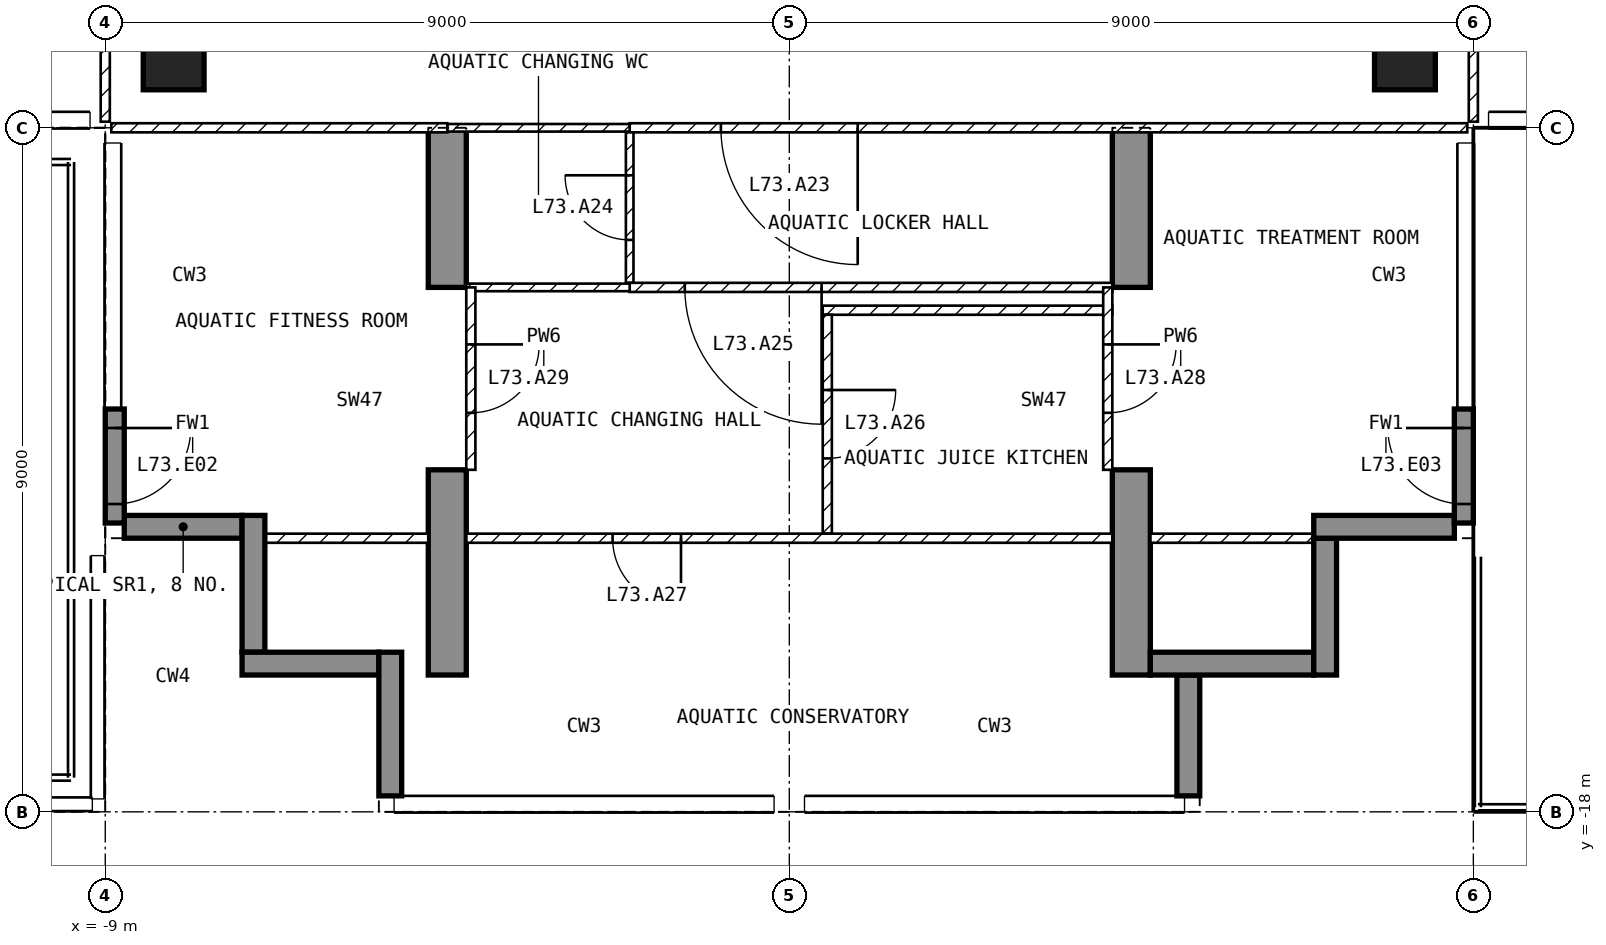
"""IFC4 building model, lengths in metres.
Left out: names, types, materials, properties, quantities, classifications, styles, units other than length and angle.
Written with IfcOpenShell. Run it as: python <this file> out.ifc"""

import sys

from ifc_helpers import new_model, si_unit, direction, frame, frame_2d, origin, origin_2d, place, context, subcontext, project, spatial, polyline, rectangle, outline, extrude, element, fill, save


model = new_model("IFC4")
c1 = context("Model", 3, precision=1e-05, world=origin(), true_north=direction((0.0, 1.0)))
c2 = subcontext(c1, "Body", "Model", "MODEL_VIEW")
j1 = project(units=[si_unit("LENGTHUNIT", "METRE"), si_unit("PLANEANGLEUNIT", "RADIAN")], contexts=[c1])
p1 = place(None, origin())
s1 = spatial("IfcSite", under=j1, at=p1, CompositionType="ELEMENT")
p2 = place(p1, origin())
s2 = spatial("IfcBuilding", under=s1, at=p2, CompositionType="ELEMENT")
p3 = place(p2, frame((0.0, 0.0, 285.0)))
s3 = spatial("IfcBuildingStorey", under=s2, at=p3, CompositionType="ELEMENT", Elevation=285.0)
for number, where, z_axis, x_axis in (
    (1, (-8.1, -8.1, -0.3), (0.0, 0.0, 1.0), (1.0, 0.0, 0.0)),
    (2, (8.1, -8.1, -0.3), (0.0, 0.0, 1.0), (1.0, 0.0, 0.0)),
):
    element("IfcColumn", number, at=place(p3, frame(where, z_axis=z_axis, x_axis=x_axis)), inside=s3, PredefinedType="COLUMN", context=c2, shape_type="SweptSolid", body=[
        extrude(rectangle(XDim=0.8, YDim=0.8, at=origin_2d()), origin(), (0.0, 0.0, 1.0), 5.45),
    ])
for number, where, z_axis, x_axis in (
    (3, (-4.75, -16.2, -0.3), (1.0, 0.0, 0.0), (0.0, 1.0, 0.0)),
    (4, (4.25, -16.2, -0.3), (1.0, 0.0, 0.0), (0.0, 1.0, 0.0)),
):
    element("IfcWall", number, at=place(p3, frame(where, z_axis=z_axis, x_axis=x_axis)), inside=s3, PredefinedType="SHEAR", context=c2, shape_type="SweptSolid", body=[
        extrude(outline(polyline([(0.0, 0.0), (2.7, 0.0), (2.7, 2.7), (5.1, 2.7), (5.1, 0.0), (7.2, 0.0), (7.2, 5.45), (0.0, 5.45), (0.0, 0.0)])), origin(), (0.0, 0.0, 1.0), 0.5),
    ])
p4 = place(p3, frame((-8.875, -12.7, 0.0), z_axis=(0.0, 0.0, 1.0), x_axis=(0.0, -1.0, 0.0)))
e5 = element("IfcWall", 5, at=p4, inside=s3, PredefinedType="SOLIDWALL", context=c2, shape_type="SweptSolid", body=[
    extrude(rectangle(XDim=1.5, YDim=0.25, at=frame_2d((0.75, 0.0))), origin(), (0.0, 0.0, 1.0), 5.15),
])
p5 = place(p4, frame((0.25, 0.0, 0.0)))
e6 = element("IfcOpeningElement", 6, at=p5, cuts=e5, PredefinedType="OPENING", context=c2, shape_type="SweptSolid", body=[
    extrude(rectangle(XDim=1.0, YDim=2.4, at=frame_2d((0.5, 1.2))), frame((0.0, 0.135, 0.0), z_axis=(0.0, -1.0, 0.0), x_axis=(1.0, 0.0, 0.0)), (0.0, 0.0, 1.0), 0.27),
])
p6 = place(p3, frame((8.875, -14.2, 0.0), z_axis=(0.0, 0.0, 1.0), x_axis=(0.0, 1.0, 0.0)))
e7 = element("IfcWall", 7, at=p6, inside=s3, PredefinedType="SOLIDWALL", context=c2, shape_type="SweptSolid", body=[
    extrude(rectangle(XDim=1.5, YDim=0.25, at=frame_2d((0.75, 0.0))), origin(), (0.0, 0.0, 1.0), 5.15),
])
p7 = place(p6, frame((0.25, 0.0, 0.0)))
e8 = element("IfcOpeningElement", 8, at=p7, cuts=e7, PredefinedType="OPENING", context=c2, shape_type="SweptSolid", body=[
    extrude(rectangle(XDim=1.0, YDim=2.4, at=frame_2d((0.5, 1.2))), frame((0.0, 0.135, 0.0), z_axis=(0.0, -1.0, 0.0), x_axis=(1.0, 0.0, 0.0)), (0.0, 0.0, 1.0), 0.27),
])
p8 = place(p3, frame((5.25, -17.79, 0.0), z_axis=(0.0, 0.0, 1.0), x_axis=(0.0, 1.0, 0.0)))
e9 = element("IfcWall", 9, at=p8, inside=s3, PredefinedType="SOLIDWALL", context=c2, shape_type="SweptSolid", body=[
    extrude(rectangle(XDim=1.59, YDim=0.3, at=frame_2d((0.795, 0.0))), origin(), (0.0, 0.0, 1.0), 5.15),
])
p9 = place(p3, frame((4.75, -16.05, 0.0), z_axis=(0.0, 0.0, 1.0), x_axis=(1.0, 0.0, 0.0)))
e10 = element("IfcWall", 10, at=p9, inside=s3, PredefinedType="SOLIDWALL", context=c2, shape_type="SweptSolid", body=[
    extrude(rectangle(XDim=2.15, YDim=0.3, at=frame_2d((1.075, 0.0))), origin(), (0.0, 0.0, 1.0), 5.15),
])
p10 = place(p3, frame((7.05, -16.2, 0.0), z_axis=(0.0, 0.0, 1.0), x_axis=(0.0, 1.0, 0.0)))
e11 = element("IfcWall", 11, at=p10, inside=s3, PredefinedType="SOLIDWALL", context=c2, shape_type="SweptSolid", body=[
    extrude(rectangle(XDim=1.8, YDim=0.3, at=frame_2d((0.9, 0.0))), origin(), (0.0, 0.0, 1.0), 5.15),
])
p11 = place(p3, frame((6.9, -14.25, 0.0), z_axis=(0.0, 0.0, 1.0), x_axis=(1.0, 0.0, 0.0)))
e12 = element("IfcWall", 12, at=p11, inside=s3, PredefinedType="SOLIDWALL", context=c2, shape_type="SweptSolid", body=[
    extrude(rectangle(XDim=1.85, YDim=0.3, at=frame_2d((0.925, 0.0))), origin(), (0.0, 0.0, 1.0), 5.15),
])
p12 = place(p3, frame((-8.75, -14.25, 0.0), z_axis=(0.0, 0.0, 1.0), x_axis=(1.0, 0.0, 0.0)))
e13 = element("IfcWall", 13, at=p12, inside=s3, PredefinedType="SOLIDWALL", context=c2, shape_type="SweptSolid", body=[
    extrude(rectangle(XDim=1.55, YDim=0.3, at=frame_2d((0.775, 0.0))), origin(), (0.0, 0.0, 1.0), 5.15),
])
p13 = place(p3, frame((-7.05, -14.1, 0.0), z_axis=(0.0, 0.0, 1.0), x_axis=(0.0, -1.0, 0.0)))
e14 = element("IfcWall", 14, at=p13, inside=s3, PredefinedType="SOLIDWALL", context=c2, shape_type="SweptSolid", body=[
    extrude(rectangle(XDim=1.8, YDim=0.3, at=frame_2d((0.9, 0.0))), origin(), (0.0, 0.0, 1.0), 5.15),
])
p14 = place(p3, frame((-7.2, -16.05, 0.0), z_axis=(0.0, 0.0, 1.0), x_axis=(1.0, 0.0, 0.0)))
e15 = element("IfcWall", 15, at=p14, inside=s3, PredefinedType="SOLIDWALL", context=c2, shape_type="SweptSolid", body=[
    extrude(rectangle(XDim=1.8, YDim=0.3, at=frame_2d((0.9, 0.0))), origin(), (0.0, 0.0, 1.0), 5.15),
])
p15 = place(p3, frame((-5.25, -15.9, 0.0), z_axis=(0.0, 0.0, 1.0), x_axis=(0.0, -1.0, 0.0)))
e16 = element("IfcWall", 16, at=p15, inside=s3, PredefinedType="SOLIDWALL", context=c2, shape_type="SweptSolid", body=[
    extrude(rectangle(XDim=1.89, YDim=0.3, at=frame_2d((0.945, 0.0))), origin(), (0.0, 0.0, 1.0), 5.15),
])
p16 = place(p3, frame((9.0, -1.26, 0.0), z_axis=(0.0, 0.0, 1.0), x_axis=(0.0, -1.0, 0.0)))
e17 = element("IfcWall", 17, at=p16, inside=s3, PredefinedType="PARTITIONING", context=c2, shape_type="SweptSolid", body=[
    extrude(rectangle(XDim=7.66, YDim=0.12, at=frame_2d((3.83, 0.0))), origin(), (0.0, 0.0, 1.0), 5.15),
])
p17 = place(p16, frame((4.44, 0.0, 0.0)))
e18 = element("IfcOpeningElement", 18, at=p17, cuts=e17, PredefinedType="OPENING", context=c2, shape_type="SweptSolid", body=[
    extrude(rectangle(XDim=0.9, YDim=2.1, at=frame_2d((0.45, 1.05))), frame((0.0, 0.07, 0.0), z_axis=(0.0, -1.0, 0.0), x_axis=(1.0, 0.0, 0.0)), (0.0, 0.0, 1.0), 0.14),
])
p18 = place(p3, frame((-9.0, -8.92, 0.0), z_axis=(0.0, 0.0, 1.0), x_axis=(0.0, 1.0, 0.0)))
e19 = element("IfcWall", 19, at=p18, inside=s3, PredefinedType="PARTITIONING", context=c2, shape_type="SweptSolid", body=[
    extrude(rectangle(XDim=7.66, YDim=0.12, at=frame_2d((3.83, 0.0))), origin(), (0.0, 0.0, 1.0), 5.15),
])
p19 = place(p18, frame((2.32, 0.0, 0.0)))
e20 = element("IfcOpeningElement", 20, at=p19, cuts=e19, PredefinedType="OPENING", context=c2, shape_type="SweptSolid", body=[
    extrude(rectangle(XDim=0.9, YDim=2.1, at=frame_2d((0.45, 1.05))), frame((0.0, 0.07, 0.0), z_axis=(0.0, -1.0, 0.0), x_axis=(1.0, 0.0, 0.0)), (0.0, 0.0, 1.0), 0.14),
])
p20 = place(p18, frame((5.89, 0.0, 0.0)))
e21 = element("IfcOpeningElement", 21, at=p20, cuts=e19, PredefinedType="OPENING", context=c2, shape_type="SweptSolid", body=[
    extrude(rectangle(XDim=0.9, YDim=2.1, at=frame_2d((0.45, 1.05))), frame((0.0, 0.07, 0.0), z_axis=(0.0, -1.0, 0.0), x_axis=(1.0, 0.0, 0.0)), (0.0, 0.0, 1.0), 0.14),
])
p21 = place(p3, frame((8.92, -9.0, 0.0), z_axis=(0.0, 0.0, 1.0), x_axis=(-1.0, 0.0, 0.0)))
e22 = element("IfcWall", 22, at=p21, inside=s3, PredefinedType="PARTITIONING", context=c2, shape_type="SweptSolid", body=[
    extrude(rectangle(XDim=11.02, YDim=0.12, at=frame_2d((5.51, 0.0))), origin(), (0.0, 0.0, 1.0), 5.15),
])
p22 = place(p21, frame((8.02, 0.0, 0.0)))
e23 = element("IfcOpeningElement", 23, at=p22, cuts=e22, PredefinedType="OPENING", context=c2, shape_type="SweptSolid", body=[
    extrude(rectangle(XDim=1.8, YDim=2.1, at=frame_2d((0.9, 1.05))), frame((0.0, 0.07, 0.0), z_axis=(0.0, -1.0, 0.0), x_axis=(1.0, 0.0, 0.0)), (0.0, 0.0, 1.0), 0.14),
])
p23 = place(p3, frame((-2.1, -9.0, 0.0), z_axis=(0.0, 0.0, 1.0), x_axis=(-1.0, 0.0, 0.0)))
e24 = element("IfcWall", 24, at=p23, inside=s3, PredefinedType="PARTITIONING", context=c2, shape_type="SweptSolid", body=[
    extrude(rectangle(XDim=2.4, YDim=0.1, at=frame_2d((1.2, 0.0))), origin(), (0.0, 0.0, 1.0), 5.15),
])
p24 = place(p3, frame((-4.5, -9.0, 0.0), z_axis=(0.0, 0.0, 1.0), x_axis=(-1.0, 0.0, 0.0)))
e25 = element("IfcWall", 25, at=p24, inside=s3, PredefinedType="PARTITIONING", context=c2, shape_type="SweptSolid", body=[
    extrude(rectangle(XDim=4.42, YDim=0.12, at=frame_2d((2.21, 0.0))), origin(), (0.0, 0.0, 1.0), 5.15),
])
p25 = place(p3, frame((-2.1, -11.04, 0.0), z_axis=(0.0, 0.0, 1.0), x_axis=(0.0, 1.0, 0.0)))
e26 = element("IfcWall", 26, at=p25, inside=s3, PredefinedType="PARTITIONING", context=c2, shape_type="SweptSolid", body=[
    extrude(rectangle(XDim=1.98, YDim=0.1, at=frame_2d((0.99, 0.0))), origin(), (0.0, 0.0, 1.0), 5.15),
])
p26 = place(p25, frame((0.565, 0.0, 0.0)))
e27 = element("IfcOpeningElement", 27, at=p26, cuts=e26, PredefinedType="OPENING", context=c2, shape_type="SweptSolid", body=[
    extrude(rectangle(XDim=0.85, YDim=2.1, at=frame_2d((0.425, 1.05))), frame((0.0, 0.06, 0.0), z_axis=(0.0, -1.0, 0.0), x_axis=(1.0, 0.0, 0.0)), (0.0, 0.0, 1.0), 0.12),
])
p27 = place(p3, frame((4.25, -11.1, 0.0), z_axis=(0.0, 0.0, 1.0), x_axis=(-1.0, 0.0, 0.0)))
e28 = element("IfcWall", 28, at=p27, inside=s3, PredefinedType="PARTITIONING", context=c2, shape_type="SweptSolid", body=[
    extrude(rectangle(XDim=6.35, YDim=0.12, at=frame_2d((3.175, 0.0))), origin(), (0.0, 0.0, 1.0), 5.15),
])
p28 = place(p27, frame((3.825, 0.0, 0.0)))
e29 = element("IfcOpeningElement", 29, at=p28, cuts=e28, PredefinedType="OPENING", context=c2, shape_type="SweptSolid", body=[
    extrude(rectangle(XDim=1.8, YDim=2.1, at=frame_2d((0.9, 1.05))), frame((0.0, 0.07, 0.0), z_axis=(0.0, -1.0, 0.0), x_axis=(1.0, 0.0, 0.0)), (0.0, 0.0, 1.0), 0.14),
])
p29 = place(p3, frame((-2.1, -11.1, 0.0), z_axis=(0.0, 0.0, 1.0), x_axis=(-1.0, 0.0, 0.0)))
e30 = element("IfcWall", 30, at=p29, inside=s3, PredefinedType="PARTITIONING", context=c2, shape_type="SweptSolid", body=[
    extrude(rectangle(XDim=2.15, YDim=0.1, at=frame_2d((1.075, 0.0))), origin(), (0.0, 0.0, 1.0), 5.15),
])
p30 = place(p3, frame((4.25, -11.4, 0.0), z_axis=(0.0, 0.0, 1.0), x_axis=(-1.0, 0.0, 0.0)))
e31 = element("IfcWall", 31, at=p30, inside=s3, PredefinedType="PARTITIONING", context=c2, shape_type="SweptSolid", body=[
    extrude(rectangle(XDim=3.81, YDim=0.12, at=frame_2d((1.905, 0.0))), origin(), (0.0, 0.0, 1.0), 5.15),
])
p31 = place(p3, frame((0.5, -11.46, 0.0), z_axis=(0.0, 0.0, 1.0), x_axis=(0.0, -1.0, 0.0)))
e32 = element("IfcWall", 32, at=p31, inside=s3, PredefinedType="PARTITIONING", context=c2, shape_type="SweptSolid", body=[
    extrude(rectangle(XDim=2.88, YDim=0.12, at=frame_2d((1.44, 0.0))), origin(), (0.0, 0.0, 1.0), 5.15),
])
p32 = place(p31, frame((0.99, 0.0, 0.0)))
e33 = element("IfcOpeningElement", 33, at=p32, cuts=e32, PredefinedType="OPENING", context=c2, shape_type="SweptSolid", body=[
    extrude(rectangle(XDim=0.9, YDim=2.1, at=frame_2d((0.45, 1.05))), frame((0.0, 0.07, 0.0), z_axis=(0.0, -1.0, 0.0), x_axis=(1.0, 0.0, 0.0)), (0.0, 0.0, 1.0), 0.14),
])
p33 = place(p3, frame((4.25, -14.4, 0.0), z_axis=(0.0, 0.0, 1.0), x_axis=(-1.0, 0.0, 0.0)))
e34 = element("IfcWall", 34, at=p33, inside=s3, PredefinedType="PARTITIONING", context=c2, shape_type="SweptSolid", body=[
    extrude(rectangle(XDim=8.5, YDim=0.12, at=frame_2d((4.25, 0.0))), origin(), (0.0, 0.0, 1.0), 5.15),
])
p34 = place(p33, frame((5.675, 0.0, 0.0)))
e35 = element("IfcOpeningElement", 35, at=p34, cuts=e34, PredefinedType="OPENING", context=c2, shape_type="SweptSolid", body=[
    extrude(rectangle(XDim=0.9, YDim=2.1, at=frame_2d((0.45, 1.05))), frame((0.0, 0.07, 0.0), z_axis=(0.0, -1.0, 0.0), x_axis=(1.0, 0.0, 0.0)), (0.0, 0.0, 1.0), 0.14),
])
for number, where, z_axis, x_axis in (
    (36, (7.12, -14.4, 0.0), (0.0, 0.0, 1.0), (-1.0, 0.0, 0.0)),
    (37, (-4.75, -14.4, 0.0), (0.0, 0.0, 1.0), (-1.0, 0.0, 0.0)),
):
    element("IfcWall", number, at=place(p3, frame(where, z_axis=z_axis, x_axis=x_axis)), inside=s3, PredefinedType="PARTITIONING", context=c2, shape_type="SweptSolid", body=[
        extrude(rectangle(XDim=2.37, YDim=0.12, at=frame_2d((1.185, 0.0))), origin(), (0.0, 0.0, 1.0), 5.15),
    ])
p35 = place(p3, frame((4.19, -11.1, 0.0), z_axis=(0.0, 0.0, 1.0), x_axis=(0.0, -1.0, 0.0)))
e38 = element("IfcWall", 38, at=p35, inside=s3, PredefinedType="PARTITIONING", context=c2, shape_type="SweptSolid", body=[
    extrude(rectangle(XDim=2.4, YDim=0.12, at=frame_2d((1.2, 0.0))), origin(), (0.0, 0.0, 1.0), 2.4),
])
p36 = place(p35, frame((0.75, 0.0, 0.0)))
e39 = element("IfcOpeningElement", 39, at=p36, cuts=e38, PredefinedType="OPENING", context=c2, shape_type="SweptSolid", body=[
    extrude(rectangle(XDim=0.9, YDim=2.1, at=frame_2d((0.45, 1.05))), frame((0.0, 0.07, 0.0), z_axis=(0.0, -1.0, 0.0), x_axis=(1.0, 0.0, 0.0)), (0.0, 0.0, 1.0), 0.14),
])
p37 = place(p3, frame((-4.19, -11.1, 0.0), z_axis=(0.0, 0.0, 1.0), x_axis=(0.0, -1.0, 0.0)))
e40 = element("IfcWall", 40, at=p37, inside=s3, PredefinedType="PARTITIONING", context=c2, shape_type="SweptSolid", body=[
    extrude(rectangle(XDim=2.4, YDim=0.12, at=frame_2d((1.2, 0.0))), origin(), (0.0, 0.0, 1.0), 2.4),
])
p38 = place(p37, frame((0.75, 0.0, 0.0)))
e41 = element("IfcOpeningElement", 41, at=p38, cuts=e40, PredefinedType="OPENING", context=c2, shape_type="SweptSolid", body=[
    extrude(rectangle(XDim=0.9, YDim=2.1, at=frame_2d((0.45, 1.05))), frame((0.0, 0.07, 0.0), z_axis=(0.0, -1.0, 0.0), x_axis=(1.0, 0.0, 0.0)), (0.0, 0.0, 1.0), 0.14),
])
p39 = place(p5, origin())
e42 = element("IfcDoor", 42, at=p39, inside=s3, OperationType="SINGLE_SWING_LEFT", PredefinedType="DOOR", context=c2, shape_type="SweptSolid", body=[
    extrude(rectangle(XDim=1.0, YDim=2.4, at=frame_2d((0.5, 1.2))), frame((0.0, 0.025, 0.0), z_axis=(0.0, -1.0, 0.0), x_axis=(1.0, 0.0, 0.0)), (0.0, 0.0, 1.0), 0.05),
])
fill(e6, e42)
p40 = place(p7, origin())
e43 = element("IfcDoor", 43, at=p40, inside=s3, OperationType="SINGLE_SWING_RIGHT", PredefinedType="DOOR", context=c2, shape_type="SweptSolid", body=[
    extrude(rectangle(XDim=1.0, YDim=2.4, at=frame_2d((0.5, 1.2))), frame((0.0, 0.025, 0.0), z_axis=(0.0, -1.0, 0.0), x_axis=(1.0, 0.0, 0.0)), (0.0, 0.0, 1.0), 0.05),
])
fill(e8, e43)
p41 = place(p22, origin())
e44 = element("IfcDoor", 44, at=p41, inside=s3, OperationType="SINGLE_SWING_LEFT", PredefinedType="DOOR", context=c2, shape_type="SweptSolid", body=[
    extrude(rectangle(XDim=1.8, YDim=2.1, at=frame_2d((0.9, 1.05))), frame((0.0, 0.025, 0.0), z_axis=(0.0, -1.0, 0.0), x_axis=(1.0, 0.0, 0.0)), (0.0, 0.0, 1.0), 0.05),
])
fill(e23, e44)
p42 = place(p26, origin())
e45 = element("IfcDoor", 45, at=p42, inside=s3, OperationType="SINGLE_SWING_RIGHT", PredefinedType="DOOR", context=c2, shape_type="SweptSolid", body=[
    extrude(rectangle(XDim=0.85, YDim=2.1, at=frame_2d((0.425, 1.05))), frame((0.0, 0.025, 0.0), z_axis=(0.0, -1.0, 0.0), x_axis=(1.0, 0.0, 0.0)), (0.0, 0.0, 1.0), 0.05),
])
fill(e27, e45)
p43 = place(p28, origin())
e46 = element("IfcDoor", 46, at=p43, inside=s3, OperationType="SINGLE_SWING_LEFT", PredefinedType="DOOR", context=c2, shape_type="SweptSolid", body=[
    extrude(rectangle(XDim=1.8, YDim=2.1, at=frame_2d((0.9, 1.05))), frame((0.0, 0.025, 0.0), z_axis=(0.0, -1.0, 0.0), x_axis=(1.0, 0.0, 0.0)), (0.0, 0.0, 1.0), 0.05),
])
fill(e29, e46)
p44 = place(p32, origin())
e47 = element("IfcDoor", 47, at=p44, inside=s3, OperationType="SINGLE_SWING_LEFT", PredefinedType="DOOR", context=c2, shape_type="SweptSolid", body=[
    extrude(rectangle(XDim=0.9, YDim=2.1, at=frame_2d((0.45, 1.05))), frame((0.0, 0.025, 0.0), z_axis=(0.0, -1.0, 0.0), x_axis=(1.0, 0.0, 0.0)), (0.0, 0.0, 1.0), 0.05),
])
fill(e33, e47)
p45 = place(p34, origin())
e48 = element("IfcDoor", 48, at=p45, inside=s3, OperationType="SINGLE_SWING_LEFT", PredefinedType="DOOR", context=c2, shape_type="SweptSolid", body=[
    extrude(rectangle(XDim=0.9, YDim=2.1, at=frame_2d((0.45, 1.05))), frame((0.0, 0.025, 0.0), z_axis=(0.0, -1.0, 0.0), x_axis=(1.0, 0.0, 0.0)), (0.0, 0.0, 1.0), 0.05),
])
fill(e35, e48)
p46 = place(p36, origin())
e49 = element("IfcDoor", 49, at=p46, inside=s3, OperationType="SINGLE_SWING_LEFT", PredefinedType="DOOR", context=c2, shape_type="SweptSolid", body=[
    extrude(rectangle(XDim=0.9, YDim=2.1, at=frame_2d((0.45, 1.05))), frame((0.0, 0.025, 0.0), z_axis=(0.0, -1.0, 0.0), x_axis=(1.0, 0.0, 0.0)), (0.0, 0.0, 1.0), 0.05),
])
fill(e39, e49)
p47 = place(p38, origin())
e50 = element("IfcDoor", 50, at=p47, inside=s3, OperationType="SINGLE_SWING_LEFT", PredefinedType="DOOR", context=c2, shape_type="SweptSolid", body=[
    extrude(rectangle(XDim=0.9, YDim=2.1, at=frame_2d((0.45, 1.05))), frame((0.0, 0.025, 0.0), z_axis=(0.0, -1.0, 0.0), x_axis=(1.0, 0.0, 0.0)), (0.0, 0.0, 1.0), 0.05),
])
fill(e41, e50)
save(model, sys.argv[1])
